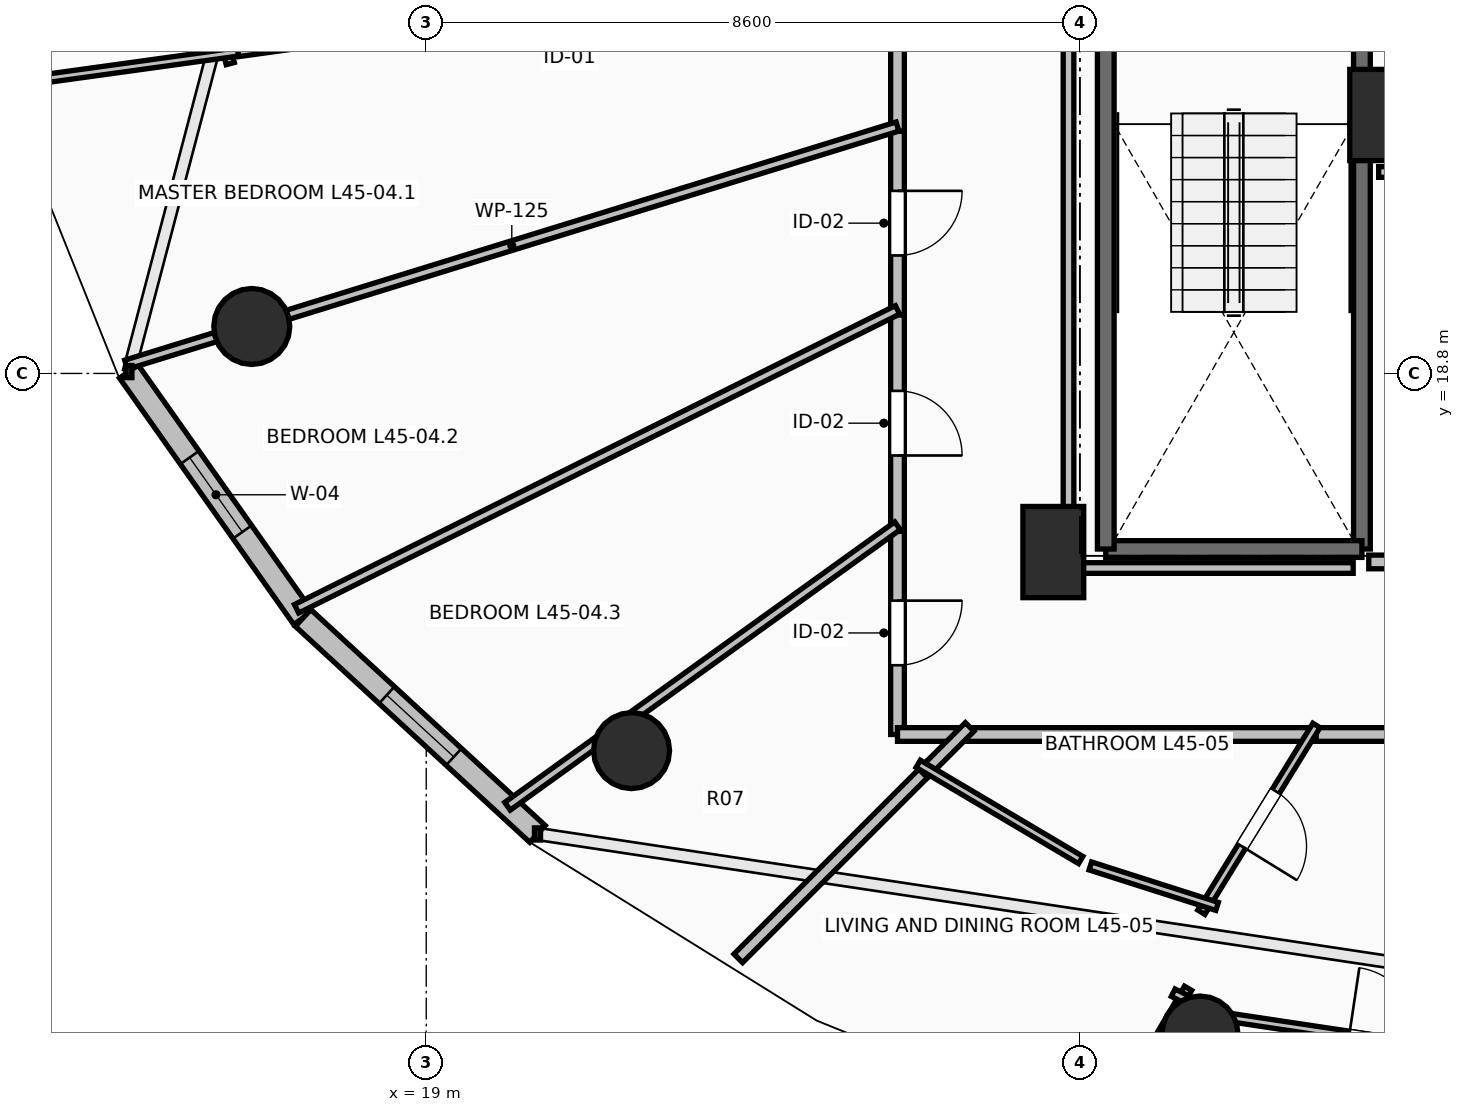
"""IFC4 building model, lengths in metres.
Left out: names, types, materials, properties, quantities, classifications, styles, units other than length and angle.
Written with IfcOpenShell. Run it as: python <this file> out.ifc"""

import sys

from ifc_helpers import new_model, si_unit, direction, frame, frame_2d, origin, origin_2d, place, context, subcontext, project, spatial, rectangle, circle, extrude, element, fill, save


model = new_model("IFC4")
c1 = context("Model", 3, precision=1e-05, world=origin(), true_north=direction((0.0, 1.0)))
c2 = subcontext(c1, "Body", "Model", "MODEL_VIEW")
j1 = project(units=[si_unit("LENGTHUNIT", "METRE"), si_unit("PLANEANGLEUNIT", "RADIAN")], contexts=[c1])
p1 = place(None, origin())
s1 = spatial("IfcSite", under=j1, at=p1, CompositionType="ELEMENT")
p2 = place(p1, origin())
s2 = spatial("IfcBuilding", under=s1, at=p2, CompositionType="ELEMENT")
p3 = place(p2, frame((0.0, 0.0, 167.6)))
s3 = spatial("IfcBuildingStorey", under=s2, at=p3, CompositionType="ELEMENT", Elevation=167.6)
for number, where, z_axis, x_axis in (
    (1, (16.705, 19.418, 0.0), (0.0, 0.0, 1.0), (-0.924, -0.383, 0.0)),
    (2, (21.701, 13.838, 0.0), (0.0, 0.0, 1.0), (-0.707, -0.707, 0.0)),
    (3, (29.179, 10.109, 0.0), (0.0, 0.0, 1.0), (-0.383, -0.924, 0.0)),
):
    element("IfcColumn", number, at=place(p3, frame(where, z_axis=z_axis, x_axis=x_axis)), inside=s3, PredefinedType="COLUMN", context=c2, shape_type="SweptSolid", body=[
        extrude(circle(Radius=0.5, at=origin_2d()), origin(), (0.0, 0.0, 1.0), 3.5),
    ])
for number, where, z_axis, x_axis in (
    (4, (27.25, 16.45, 0.0), (0.0, 0.0, 1.0), (1.0, 0.0, 0.0)),
    (5, (31.55, 22.2, 0.0), (0.0, 0.0, 1.0), (1.0, 0.0, 0.0)),
):
    element("IfcColumn", number, at=place(p3, frame(where, z_axis=z_axis, x_axis=x_axis)), inside=s3, PredefinedType="PILASTER", context=c2, shape_type="SweptSolid", body=[
        extrude(rectangle(XDim=0.8, YDim=1.2, at=origin_2d()), origin(), (0.0, 0.0, 1.0), 3.5),
    ])
p4 = place(p3, frame((15.088, 18.825, 0.0), z_axis=(0.0, 0.0, 1.0), x_axis=(0.577269753207, -0.816553508371, 0.0)))
e6 = element("IfcWall", 6, at=p4, inside=s3, PredefinedType="STANDARD", context=c2, shape_type="SweptSolid", body=[
    extrude(rectangle(XDim=3.97, YDim=0.3, at=frame_2d((1.985, 0.0))), origin(), (0.0, 0.0, 1.0), 3.24),
])
p5 = place(p4, frame((1.385, 0.0, 0.85)))
e7 = element("IfcOpeningElement", 7, at=p5, cuts=e6, PredefinedType="OPENING", context=c2, shape_type="SweptSolid", body=[
    extrude(rectangle(XDim=1.2, YDim=1.95, at=frame_2d((0.6, 0.975))), frame((0.0, 0.165, 0.0), z_axis=(0.0, -1.0, 0.0), x_axis=(1.0, 0.0, 0.0)), (0.0, 0.0, 1.0), 0.33),
])
p6 = place(p3, frame((17.38, 15.583, 0.0), z_axis=(0.0, 0.0, 1.0), x_axis=(0.735477154165, -0.677549522693, 0.0)))
e8 = element("IfcWall", 8, at=p6, inside=s3, PredefinedType="STANDARD", context=c2, shape_type="SweptSolid", body=[
    extrude(rectangle(XDim=4.194, YDim=0.3, at=frame_2d((2.097, 0.0))), origin(), (0.0, 0.0, 1.0), 3.24),
])
p7 = place(p6, frame((1.497, 0.0, 0.85)))
e9 = element("IfcOpeningElement", 9, at=p7, cuts=e8, PredefinedType="OPENING", context=c2, shape_type="SweptSolid", body=[
    extrude(rectangle(XDim=1.2, YDim=1.95, at=frame_2d((0.6, 0.975))), frame((0.0, 0.165, 0.0), z_axis=(0.0, -1.0, 0.0), x_axis=(1.0, 0.0, 0.0)), (0.0, 0.0, 1.0), 0.33),
])
p8 = place(p3, frame((31.31, 23.91, 0.0), z_axis=(0.0, 0.0, 1.0), x_axis=(0.0, -1.0, 0.0)))
e10 = element("IfcWall", 10, at=p8, inside=s3, PredefinedType="SOLIDWALL", context=c2, shape_type="SweptSolid", body=[
    extrude(rectangle(XDim=7.42, YDim=0.22, at=frame_2d((3.71, 0.0))), origin(), (0.0, 0.0, 1.0), 3.24),
])
p9 = place(p3, frame((31.31, 16.49, 0.0), z_axis=(0.0, 0.0, 1.0), x_axis=(-1.0, 0.0, 0.0)))
e11 = element("IfcWall", 11, at=p9, inside=s3, PredefinedType="SOLIDWALL", context=c2, shape_type="SweptSolid", body=[
    extrude(rectangle(XDim=3.37, YDim=0.22, at=frame_2d((1.685, 0.0))), origin(), (0.0, 0.0, 1.0), 3.24),
])
p10 = place(p3, frame((27.94, 16.49, 0.0), z_axis=(0.0, 0.0, 1.0), x_axis=(0.0, 1.0, 0.0)))
e12 = element("IfcWall", 12, at=p10, inside=s3, PredefinedType="SOLIDWALL", context=c2, shape_type="SweptSolid", body=[
    extrude(rectangle(XDim=7.42, YDim=0.22, at=frame_2d((3.71, 0.0))), origin(), (0.0, 0.0, 1.0), 3.24),
])
p11 = place(p3, frame((31.4, 16.32, 0.0), z_axis=(0.0, 0.0, 1.0), x_axis=(1.0, 0.0, 0.0)))
e13 = element("IfcWall", 13, at=p11, inside=s3, PredefinedType="PARTITIONING", context=c2, shape_type="SweptSolid", body=[
    extrude(rectangle(XDim=4.4, YDim=0.18, at=frame_2d((2.2, 0.0))), origin(), (0.0, 0.0, 1.0), 3.24),
])
p12 = place(p11, frame((1.775, 0.0, 0.0)))
e14 = element("IfcOpeningElement", 14, at=p12, cuts=e13, PredefinedType="OPENING", context=c2, shape_type="SweptSolid", body=[
    extrude(rectangle(XDim=0.85, YDim=2.1, at=frame_2d((0.425, 1.05))), frame((0.0, 0.105, 0.0), z_axis=(0.0, -1.0, 0.0), x_axis=(1.0, 0.0, 0.0)), (0.0, 0.0, 1.0), 0.21),
])
p13 = place(p3, frame((25.2, 24.29, 0.0), z_axis=(0.0, 0.0, 1.0), x_axis=(0.0, -1.0, 0.0)))
e15 = element("IfcWall", 15, at=p13, inside=s3, PredefinedType="PARTITIONING", context=c2, shape_type="SweptSolid", body=[
    extrude(rectangle(XDim=2.305, YDim=0.18, at=frame_2d((1.152, 0.0))), origin(), (0.0, 0.0, 1.0), 3.24),
])
p14 = place(p3, frame((25.2, 21.985, 0.0), z_axis=(0.0, 0.0, 1.0), x_axis=(0.0, -1.0, 0.0)))
e16 = element("IfcWall", 16, at=p14, inside=s3, PredefinedType="PARTITIONING", context=c2, shape_type="SweptSolid", body=[
    extrude(rectangle(XDim=2.416, YDim=0.18, at=frame_2d((1.208, 0.0))), origin(), (0.0, 0.0, 1.0), 3.24),
])
p15 = place(p14, frame((0.783, 0.0, 0.0)))
e17 = element("IfcOpeningElement", 17, at=p15, cuts=e16, PredefinedType="OPENING", context=c2, shape_type="SweptSolid", body=[
    extrude(rectangle(XDim=0.85, YDim=2.1, at=frame_2d((0.425, 1.05))), frame((0.0, 0.105, 0.0), z_axis=(0.0, -1.0, 0.0), x_axis=(1.0, 0.0, 0.0)), (0.0, 0.0, 1.0), 0.21),
])
p16 = place(p3, frame((25.2, 19.569, 0.0), z_axis=(0.0, 0.0, 1.0), x_axis=(0.0, -1.0, 0.0)))
e18 = element("IfcWall", 18, at=p16, inside=s3, PredefinedType="PARTITIONING", context=c2, shape_type="SweptSolid", body=[
    extrude(rectangle(XDim=2.847, YDim=0.18, at=frame_2d((1.424, 0.0))), origin(), (0.0, 0.0, 1.0), 2.432),
])
p17 = place(p16, frame((0.999, 0.0, 0.0)))
e19 = element("IfcOpeningElement", 19, at=p17, cuts=e18, PredefinedType="OPENING", context=c2, shape_type="SweptSolid", body=[
    extrude(rectangle(XDim=0.85, YDim=2.1, at=frame_2d((0.425, 1.05))), frame((0.0, 0.105, 0.0), z_axis=(0.0, -1.0, 0.0), x_axis=(1.0, 0.0, 0.0)), (0.0, 0.0, 1.0), 0.21),
])
p18 = place(p3, frame((25.2, 16.722, 0.0), z_axis=(0.0, 0.0, 1.0), x_axis=(0.0, -1.0, 0.0)))
e20 = element("IfcWall", 20, at=p18, inside=s3, PredefinedType="PARTITIONING", context=c2, shape_type="SweptSolid", body=[
    extrude(rectangle(XDim=2.672, YDim=0.18, at=frame_2d((1.336, 0.0))), origin(), (0.0, 0.0, 1.0), 2.432),
])
p19 = place(p18, frame((0.911, 0.0, 0.0)))
e21 = element("IfcOpeningElement", 21, at=p19, cuts=e20, PredefinedType="OPENING", context=c2, shape_type="SweptSolid", body=[
    extrude(rectangle(XDim=0.85, YDim=2.1, at=frame_2d((0.425, 1.05))), frame((0.0, 0.105, 0.0), z_axis=(0.0, -1.0, 0.0), x_axis=(1.0, 0.0, 0.0)), (0.0, 0.0, 1.0), 0.21),
])
p20 = place(p3, frame((25.2, 14.05, 0.0), z_axis=(0.0, 0.0, 1.0), x_axis=(1.0, 0.0, 0.0)))
e22 = element("IfcWall", 22, at=p20, inside=s3, PredefinedType="PARTITIONING", context=c2, shape_type="SweptSolid", body=[
    extrude(rectangle(XDim=0.91, YDim=0.18, at=frame_2d((0.455, 0.0))), origin(), (0.0, 0.0, 1.0), 2.929),
])
p21 = place(p3, frame((30.568, 14.05, 0.0), z_axis=(0.0, 0.0, 1.0), x_axis=(1.0, 0.0, 0.0)))
e23 = element("IfcWall", 23, at=p21, inside=s3, PredefinedType="PARTITIONING", context=c2, shape_type="SweptSolid", body=[
    extrude(rectangle(XDim=4.374, YDim=0.18, at=frame_2d((2.187, 0.0))), origin(), (0.0, 0.0, 1.0), 2.874),
])
p22 = place(p21, frame((1.687, 0.0, 0.0)))
e24 = element("IfcOpeningElement", 24, at=p22, cuts=e23, PredefinedType="OPENING", context=c2, shape_type="SweptSolid", body=[
    extrude(rectangle(XDim=1.0, YDim=2.15, at=frame_2d((0.5, 1.075))), frame((0.0, 0.105, 0.0), z_axis=(0.0, -1.0, 0.0), x_axis=(1.0, 0.0, 0.0)), (0.0, 0.0, 1.0), 0.21),
])
p23 = place(p3, frame((25.97, 14.05, 0.0), z_axis=(0.0, 0.0, 1.0), x_axis=(1.0, 0.0, 0.0)))
e25 = element("IfcWall", 25, at=p23, inside=s3, PredefinedType="PARTITIONING", context=c2, shape_type="SweptSolid", body=[
    extrude(rectangle(XDim=4.738, YDim=0.18, at=frame_2d((2.369, 0.0))), origin(), (0.0, 0.0, 1.0), 2.432),
])
p24 = place(p3, frame((15.965, 24.613, 0.0), z_axis=(0.0, 0.0, 1.0), x_axis=(0.254285908831, -0.96712908992, 0.0)))
e26 = element("IfcWall", 26, at=p24, inside=s3, PredefinedType="PARTITIONING", context=c2, shape_type="SweptSolid", body=[
    extrude(rectangle(XDim=1.796, YDim=0.11, at=frame_2d((0.898, 0.0))), origin(), (0.0, 0.0, 1.0), 3.24),
])
p25 = place(p3, frame((16.525, 23.03, 0.0), z_axis=(0.0, 0.0, 1.0), x_axis=(-0.990557555541, -0.137097516973, 0.0)))
e27 = element("IfcWall", 27, at=p25, inside=s3, PredefinedType="PARTITIONING", context=c2, shape_type="SweptSolid", body=[
    extrude(rectangle(XDim=3.052, YDim=0.11, at=frame_2d((1.526, 0.0))), origin(), (0.0, 0.0, 1.0), 2.728),
])
p26 = place(p3, frame((16.525, 23.03, 0.0), z_axis=(0.0, 0.0, 1.0), x_axis=(0.990569142752, 0.137013770941, 0.0)))
e28 = element("IfcWall", 28, at=p26, inside=s3, PredefinedType="PARTITIONING", context=c2, shape_type="SweptSolid", body=[
    extrude(rectangle(XDim=8.758, YDim=0.125, at=frame_2d((4.379, 0.0))), origin(), (0.0, 0.0, 1.0), 2.874),
])
p27 = place(p26, frame((3.929, 0.0, 0.0)))
e29 = element("IfcOpeningElement", 29, at=p27, cuts=e28, PredefinedType="OPENING", context=c2, shape_type="SweptSolid", body=[
    extrude(rectangle(XDim=0.9, YDim=2.1, at=frame_2d((0.45, 1.05))), frame((0.0, 0.077, 0.0), z_axis=(0.0, -1.0, 0.0), x_axis=(1.0, 0.0, 0.0)), (0.0, 0.0, 1.0), 0.155),
])
p28 = place(p3, frame((15.051, 18.915, 0.0), z_axis=(0.0, 0.0, 1.0), x_axis=(0.955505753702, 0.294972464211, 0.0)))
e30 = element("IfcWall", 30, at=p28, inside=s3, PredefinedType="PARTITIONING", context=c2, shape_type="SweptSolid", body=[
    extrude(rectangle(XDim=10.622, YDim=0.125, at=frame_2d((5.311, 0.0))), origin(), (0.0, 0.0, 1.0), 2.432),
])
p29 = place(p3, frame((17.294, 15.704, 0.0), z_axis=(0.0, 0.0, 1.0), x_axis=(0.89538182578, 0.445299209591, 0.0)))
e31 = element("IfcWall", 31, at=p29, inside=s3, PredefinedType="PARTITIONING", context=c2, shape_type="SweptSolid", body=[
    extrude(rectangle(XDim=8.83, YDim=0.125, at=frame_2d((4.415, 0.0))), origin(), (0.0, 0.0, 1.0), 2.432),
])
p30 = place(p3, frame((20.069, 13.106, 0.0), z_axis=(0.0, 0.0, 1.0), x_axis=(0.81185514799, 0.58385890306, 0.0)))
e32 = element("IfcWall", 32, at=p30, inside=s3, PredefinedType="PARTITIONING", context=c2, shape_type="SweptSolid", body=[
    extrude(rectangle(XDim=6.32, YDim=0.125, at=frame_2d((3.16, 0.0))), origin(), (0.0, 0.0, 1.0), 2.432),
])
p31 = place(p3, frame((23.105, 11.105, 0.0), z_axis=(0.0, 0.0, 1.0), x_axis=(0.707106781187, 0.707106781187, 0.0)))
e33 = element("IfcWall", 33, at=p31, inside=s3, PredefinedType="PARTITIONING", context=c2, shape_type="SweptSolid", body=[
    extrude(rectangle(XDim=3.581, YDim=0.16, at=frame_2d((1.791, 0.0))), origin(), (0.0, 0.0, 1.0), 2.728),
])
p32 = place(p3, frame((25.538, 13.538, 0.0), z_axis=(0.0, 0.0, 1.0), x_axis=(0.707106781187, 0.707106781187, 0.0)))
e34 = element("IfcWall", 34, at=p32, inside=s3, PredefinedType="PARTITIONING", context=c2, shape_type="SweptSolid", body=[
    extrude(rectangle(XDim=0.864, YDim=0.16, at=frame_2d((0.432, 0.0))), origin(), (0.0, 0.0, 1.0), 2.929),
])
p33 = place(p3, frame((30.711, 14.169, 0.0), z_axis=(0.0, 0.0, 1.0), x_axis=(-0.524536274856, -0.851388099729, 0.0)))
e35 = element("IfcWall", 35, at=p33, inside=s3, PredefinedType="PARTITIONING", context=c2, shape_type="SweptSolid", body=[
    extrude(rectangle(XDim=2.886, YDim=0.11, at=frame_2d((1.443, 0.0))), origin(), (0.0, 0.0, 1.0), 2.874),
])
p34 = place(p33, frame((1.018, 0.0, 0.0)))
e36 = element("IfcOpeningElement", 36, at=p34, cuts=e35, PredefinedType="OPENING", context=c2, shape_type="SweptSolid", body=[
    extrude(rectangle(XDim=0.85, YDim=2.1, at=frame_2d((0.425, 1.05))), frame((0.0, 0.07, 0.0), z_axis=(0.0, -1.0, 0.0), x_axis=(1.0, 0.0, 0.0)), (0.0, 0.0, 1.0), 0.14),
])
p35 = place(p3, frame((29.404, 11.788, 0.0), z_axis=(0.0, 0.0, 1.0), x_axis=(-0.952663508426, 0.304026708881, 0.0)))
e37 = element("IfcWall", 37, at=p35, inside=s3, PredefinedType="PARTITIONING", context=c2, shape_type="SweptSolid", body=[
    extrude(rectangle(XDim=1.75, YDim=0.11, at=frame_2d((0.875, 0.0))), origin(), (0.0, 0.0, 1.0), 2.432),
])
p36 = place(p3, frame((27.611, 12.399, 0.0), z_axis=(0.0, 0.0, 1.0), x_axis=(-0.860546797705, 0.509371386082, 0.0)))
e38 = element("IfcWall", 38, at=p36, inside=s3, PredefinedType="PARTITIONING", context=c2, shape_type="SweptSolid", body=[
    extrude(rectangle(XDim=2.485, YDim=0.11, at=frame_2d((1.242, 0.0))), origin(), (0.0, 0.0, 1.0), 2.929),
])
p37 = place(p3, frame((27.888, 8.779, 0.0), z_axis=(0.0, 0.0, 1.0), x_axis=(0.506572342253, 0.86219746118, 0.0)))
e39 = element("IfcWall", 39, at=p37, inside=s3, PredefinedType="PARTITIONING", context=c2, shape_type="SweptSolid", body=[
    extrude(rectangle(XDim=2.24, YDim=0.11, at=frame_2d((1.12, 0.0))), origin(), (0.0, 0.0, 1.0), 2.432),
])
p38 = place(p3, frame((28.827, 10.653, 0.0), z_axis=(0.0, 0.0, 1.0), x_axis=(0.892195428052, -0.451649552378, 0.0)))
e40 = element("IfcWall", 40, at=p38, inside=s3, PredefinedType="PARTITIONING", context=c2, shape_type="SweptSolid", body=[
    extrude(rectangle(XDim=0.813, YDim=0.11, at=frame_2d((0.407, 0.0))), origin(), (0.0, 0.0, 1.0), 2.432),
])
p39 = place(p3, frame((29.29, 10.37, 0.0), z_axis=(0.0, 0.0, 1.0), x_axis=(0.988895858235, -0.148610166425, 0.0)))
e41 = element("IfcWall", 41, at=p39, inside=s3, PredefinedType="PARTITIONING", context=c2, shape_type="SweptSolid", body=[
    extrude(rectangle(XDim=4.647, YDim=0.11, at=frame_2d((2.324, 0.0))), origin(), (0.0, 0.0, 1.0), 3.24),
])
p40 = place(p39, frame((1.874, 0.0, 0.0)))
e42 = element("IfcOpeningElement", 42, at=p40, cuts=e41, PredefinedType="OPENING", context=c2, shape_type="SweptSolid", body=[
    extrude(rectangle(XDim=0.9, YDim=2.1, at=frame_2d((0.45, 1.05))), frame((0.0, 0.07, 0.0), z_axis=(0.0, -1.0, 0.0), x_axis=(1.0, 0.0, 0.0)), (0.0, 0.0, 1.0), 0.14),
])
p41 = place(p3, frame((35.58, 21.45, 0.0), z_axis=(0.0, 0.0, 1.0), x_axis=(-1.0, 0.0, 0.0)))
e43 = element("IfcWall", 43, at=p41, inside=s3, PredefinedType="PARTITIONING", context=c2, shape_type="SweptSolid", body=[
    extrude(rectangle(XDim=4.05, YDim=0.14, at=frame_2d((2.025, 0.0))), origin(), (0.0, 0.0, 1.0), 3.24),
])
p42 = place(p3, frame((27.45, 23.754, 0.0), z_axis=(0.0, 0.0, 1.0), x_axis=(0.0, -1.0, 0.0)))
e44 = element("IfcWall", 44, at=p42, inside=s3, PredefinedType="PARTITIONING", context=c2, shape_type="SweptSolid", body=[
    extrude(rectangle(XDim=7.514, YDim=0.14, at=frame_2d((3.757, 0.0))), origin(), (0.0, 0.0, 1.0), 2.432),
])
p43 = place(p3, frame((27.45, 16.24, 0.0), z_axis=(0.0, 0.0, 1.0), x_axis=(1.0, 0.0, 0.0)))
e45 = element("IfcWall", 45, at=p43, inside=s3, PredefinedType="PARTITIONING", context=c2, shape_type="SweptSolid", body=[
    extrude(rectangle(XDim=3.745, YDim=0.14, at=frame_2d((1.873, 0.0))), origin(), (0.0, 0.0, 1.0), 2.432),
])
p44 = place(p5, origin())
e46 = element("IfcWindow", 46, at=p44, inside=s3, PartitioningType="SINGLE_PANEL", PredefinedType="WINDOW", context=c2, shape_type="SweptSolid", body=[
    extrude(rectangle(XDim=1.2, YDim=1.95, at=frame_2d((0.6, 0.975))), frame((0.0, 0.03, 0.0), z_axis=(0.0, -1.0, 0.0), x_axis=(1.0, 0.0, 0.0)), (0.0, 0.0, 1.0), 0.06),
])
fill(e7, e46)
p45 = place(p7, origin())
e47 = element("IfcWindow", 47, at=p45, inside=s3, PartitioningType="SINGLE_PANEL", PredefinedType="WINDOW", context=c2, shape_type="SweptSolid", body=[
    extrude(rectangle(XDim=1.2, YDim=1.95, at=frame_2d((0.6, 0.975))), frame((0.0, 0.03, 0.0), z_axis=(0.0, -1.0, 0.0), x_axis=(1.0, 0.0, 0.0)), (0.0, 0.0, 1.0), 0.06),
])
fill(e9, e47)
p46 = place(p34, origin())
e48 = element("IfcDoor", 48, at=p46, inside=s3, OperationType="SINGLE_SWING_RIGHT", PredefinedType="DOOR", context=c2, shape_type="SweptSolid", body=[
    extrude(rectangle(XDim=0.85, YDim=2.1, at=frame_2d((0.425, 1.05))), frame((0.0, 0.025, 0.0), z_axis=(0.0, -1.0, 0.0), x_axis=(1.0, 0.0, 0.0)), (0.0, 0.0, 1.0), 0.05),
])
fill(e36, e48)
p47 = place(p15, origin())
e49 = element("IfcDoor", 49, at=p47, inside=s3, OperationType="SINGLE_SWING_LEFT", PredefinedType="DOOR", context=c2, shape_type="SweptSolid", body=[
    extrude(rectangle(XDim=0.85, YDim=2.1, at=frame_2d((0.425, 1.05))), frame((0.0, 0.025, 0.0), z_axis=(0.0, -1.0, 0.0), x_axis=(1.0, 0.0, 0.0)), (0.0, 0.0, 1.0), 0.05),
])
fill(e17, e49)
p48 = place(p17, origin())
e50 = element("IfcDoor", 50, at=p48, inside=s3, OperationType="SINGLE_SWING_RIGHT", PredefinedType="DOOR", context=c2, shape_type="SweptSolid", body=[
    extrude(rectangle(XDim=0.85, YDim=2.1, at=frame_2d((0.425, 1.05))), frame((0.0, 0.025, 0.0), z_axis=(0.0, -1.0, 0.0), x_axis=(1.0, 0.0, 0.0)), (0.0, 0.0, 1.0), 0.05),
])
fill(e19, e50)
p49 = place(p19, origin())
e51 = element("IfcDoor", 51, at=p49, inside=s3, OperationType="SINGLE_SWING_LEFT", PredefinedType="DOOR", context=c2, shape_type="SweptSolid", body=[
    extrude(rectangle(XDim=0.85, YDim=2.1, at=frame_2d((0.425, 1.05))), frame((0.0, 0.025, 0.0), z_axis=(0.0, -1.0, 0.0), x_axis=(1.0, 0.0, 0.0)), (0.0, 0.0, 1.0), 0.05),
])
fill(e21, e51)
save(model, sys.argv[1])
